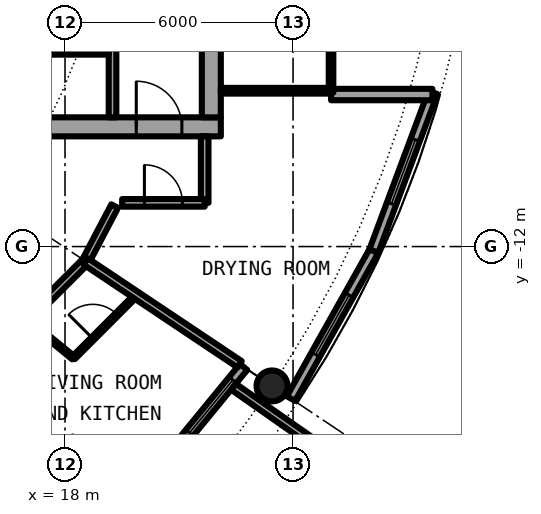
"""IFC4 building model, lengths in metres.
Left out: names, types, materials, properties, quantities, classifications, styles, units other than length and angle.
Written with IfcOpenShell. Run it as: python <this file> out.ifc"""

import sys

from ifc_helpers import new_model, si_unit, direction, frame, frame_2d, origin, origin_2d, place, context, subcontext, project, spatial, rectangle, hollow_circle, extrude, element, fill, save


model = new_model("IFC4")
c1 = context("Model", 3, precision=1e-05, world=origin(), true_north=direction((0.0, 1.0)))
c2 = subcontext(c1, "Body", "Model", "MODEL_VIEW")
j1 = project(units=[si_unit("LENGTHUNIT", "METRE"), si_unit("PLANEANGLEUNIT", "RADIAN")], contexts=[c1])
p1 = place(None, origin())
s1 = spatial("IfcSite", under=j1, at=p1, CompositionType="ELEMENT")
p2 = place(p1, origin())
s2 = spatial("IfcBuilding", under=s1, at=p2, CompositionType="ELEMENT")
p3 = place(p2, frame((0.0, 0.0, 170.75)))
s3 = spatial("IfcBuildingStorey", under=s2, at=p3, CompositionType="ELEMENT", Elevation=170.75)
p4 = place(p3, frame((23.448, -15.667, 0.0), z_axis=(0.0, 0.0, 1.0), x_axis=(1.0, 0.0, 0.0)))
e1 = element("IfcColumn", 1, at=p4, inside=s3, PredefinedType="COLUMN", context=c2, shape_type="SweptSolid", body=[
    extrude(hollow_circle(Radius=0.406, WallThickness=0.04, at=origin_2d()), origin(), (0.0, 0.0, 1.0), 3.05),
])
p5 = place(p3, frame((19.304, -19.304, 0.0), z_axis=(0.0, 0.0, 1.0), x_axis=(0.634382322723, 0.773019449054, 0.0)))
e2 = element("IfcWall", 2, at=p5, inside=s3, PredefinedType="SOLIDWALL", context=c2, shape_type="SweptSolid", body=[
    extrude(rectangle(XDim=5.352, YDim=0.25, at=frame_2d((2.676, 0.0))), origin(), (0.0, 0.0, 1.0), 2.7),
])
p6 = place(p5, frame((0.841, 0.0, 0.0)))
e3 = element("IfcOpeningElement", 3, at=p6, cuts=e2, PredefinedType="OPENING", context=c2, shape_type="SweptSolid", body=[
    extrude(rectangle(XDim=1.0, YDim=2.2, at=frame_2d((0.5, 1.1))), frame((0.0, 0.135, 0.0), z_axis=(0.0, -1.0, 0.0), x_axis=(1.0, 0.0, 0.0)), (0.0, 0.0, 1.0), 0.27),
])
p7 = place(p5, frame((3.111, 0.0, 0.3)))
e4 = element("IfcOpeningElement", 4, at=p7, cuts=e2, PredefinedType="OPENING", context=c2, shape_type="SweptSolid", body=[
    extrude(rectangle(XDim=1.8, YDim=2.1, at=frame_2d((0.9, 1.05))), frame((0.0, 0.135, 0.0), z_axis=(0.0, -1.0, 0.0), x_axis=(1.0, 0.0, 0.0)), (0.0, 0.0, 1.0), 0.27),
])
p8 = place(p3, frame((22.433, -15.688, -0.03), z_axis=(0.0, 0.0, 1.0), x_axis=(0.819373043115, -0.573260687834, 0.0)))
e5 = element("IfcWall", 5, at=p8, inside=s3, PredefinedType="SOLIDWALL", context=c2, shape_type="SweptSolid", body=[
    extrude(rectangle(XDim=2.925, YDim=0.2, at=frame_2d((1.463, 0.0))), origin(), (0.0, 0.0, 1.0), 2.73),
])
p9 = place(p3, frame((23.946, -16.0, 0.0), z_axis=(0.0, 0.0, 1.0), x_axis=(0.489696356642, 0.871893042919, 0.0)))
e6 = element("IfcWall", 6, at=p9, inside=s3, PredefinedType="SOLIDWALL", context=c2, shape_type="SweptSolid", body=[
    extrude(rectangle(XDim=4.454, YDim=0.25, at=frame_2d((2.227, 0.0))), origin(), (0.0, 0.0, 1.0), 2.7),
])
p10 = place(p9, frame((1.327, 0.0, 0.3)))
e7 = element("IfcOpeningElement", 7, at=p10, cuts=e6, PredefinedType="OPENING", context=c2, shape_type="SweptSolid", body=[
    extrude(rectangle(XDim=1.8, YDim=2.1, at=frame_2d((0.9, 1.05))), frame((0.0, 0.135, 0.0), z_axis=(0.0, -1.0, 0.0), x_axis=(1.0, 0.0, 0.0)), (0.0, 0.0, 1.0), 0.27),
])
p11 = place(p3, frame((26.127, -12.117, 0.0), z_axis=(0.0, 0.0, 1.0), x_axis=(0.349247811493, 0.937030397675, 0.0)))
e8 = element("IfcWall", 8, at=p11, inside=s3, PredefinedType="SOLIDWALL", context=c2, shape_type="SweptSolid", body=[
    extrude(rectangle(XDim=4.452, YDim=0.25, at=frame_2d((2.226, 0.0))), origin(), (0.0, 0.0, 1.0), 2.7),
])
p12 = place(p11, frame((1.327, 0.0, 0.3)))
e9 = element("IfcOpeningElement", 9, at=p12, cuts=e8, PredefinedType="OPENING", context=c2, shape_type="SweptSolid", body=[
    extrude(rectangle(XDim=1.8, YDim=2.1, at=frame_2d((0.9, 1.05))), frame((0.0, 0.135, 0.0), z_axis=(0.0, -1.0, 0.0), x_axis=(1.0, 0.0, 0.0)), (0.0, 0.0, 1.0), 0.27),
])
p13 = place(p3, frame((25.0, -8.0, 0.0), z_axis=(0.0, 0.0, 1.0), x_axis=(1.0, 0.0, 0.0)))
e10 = element("IfcWall", 10, at=p13, inside=s3, PredefinedType="SOLIDWALL", context=c2, shape_type="SweptSolid", body=[
    extrude(rectangle(XDim=2.667, YDim=0.3, at=frame_2d((1.333, 0.0))), origin(), (0.0, 0.0, 1.0), 2.7),
])
p14 = place(p3, frame((8.5, -8.85, 0.0), z_axis=(0.0, 0.0, 1.0), x_axis=(1.0, 0.0, 0.0)))
e11 = element("IfcWall", 11, at=p14, inside=s3, PredefinedType="SHEAR", context=c2, shape_type="SweptSolid", body=[
    extrude(rectangle(XDim=13.6, YDim=0.5, at=frame_2d((6.8, 0.0))), origin(), (0.0, 0.0, 1.0), 3.05),
])
p15 = place(p14, frame((11.375, 0.0, 0.0)))
e12 = element("IfcOpeningElement", 12, at=p15, cuts=e11, PredefinedType="OPENING", context=c2, shape_type="SweptSolid", body=[
    extrude(rectangle(XDim=1.2, YDim=2.3, at=frame_2d((0.6, 1.15))), frame((0.0, 0.26, 0.0), z_axis=(0.0, -1.0, 0.0), x_axis=(1.0, 0.0, 0.0)), (0.0, 0.0, 1.0), 0.52),
])
p16 = place(p3, frame((21.85, 8.6, 0.0), z_axis=(0.0, 0.0, 1.0), x_axis=(0.0, -1.0, 0.0)))
e13 = element("IfcWall", 13, at=p16, inside=s3, PredefinedType="SHEAR", context=c2, shape_type="SweptSolid", body=[
    extrude(rectangle(XDim=17.2, YDim=0.5, at=frame_2d((8.6, 0.0))), origin(), (0.0, 0.0, 1.0), 3.05),
])
p17 = place(p16, frame((7.7, 0.0, 0.0)))
e14 = element("IfcOpeningElement", 14, at=p17, cuts=e13, PredefinedType="OPENING", context=c2, shape_type="SweptSolid", body=[
    extrude(rectangle(XDim=1.8, YDim=2.3, at=frame_2d((0.9, 1.15))), frame((0.0, 0.26, 0.0), z_axis=(0.0, -1.0, 0.0), x_axis=(1.0, 0.0, 0.0)), (0.0, 0.0, 1.0), 0.52),
])
p18 = place(p3, frame((19.25, -8.6, 0.0), z_axis=(0.0, 0.0, 1.0), x_axis=(0.0, 1.0, 0.0)))
e15 = element("IfcWall", 15, at=p18, inside=s3, PredefinedType="SOLIDWALL", context=c2, shape_type="SweptSolid", body=[
    extrude(rectangle(XDim=7.025, YDim=0.2, at=frame_2d((3.513, 0.0))), origin(), (0.0, 0.0, 1.0), 2.7),
])
p19 = place(p18, frame((2.35, 0.0, 0.0)))
e16 = element("IfcOpeningElement", 16, at=p19, cuts=e15, PredefinedType="OPENING", context=c2, shape_type="SweptSolid", body=[
    extrude(rectangle(XDim=1.1, YDim=2.3, at=frame_2d((0.55, 1.15))), frame((0.0, 0.11, 0.0), z_axis=(0.0, -1.0, 0.0), x_axis=(1.0, 0.0, 0.0)), (0.0, 0.0, 1.0), 0.22),
])
p20 = place(p3, frame((15.45, -6.875, 0.0), z_axis=(0.0, 0.0, 1.0), x_axis=(1.0, 0.0, 0.0)))
e17 = element("IfcWall", 17, at=p20, inside=s3, PredefinedType="PARTITIONING", context=c2, shape_type="SweptSolid", body=[
    extrude(rectangle(XDim=3.7, YDim=0.15, at=frame_2d((1.85, 0.0))), origin(), (0.0, 0.0, 1.0), 2.7),
])
p21 = place(p20, frame((1.4, 0.0, 0.0)))
e18 = element("IfcOpeningElement", 18, at=p21, cuts=e17, PredefinedType="OPENING", context=c2, shape_type="SweptSolid", body=[
    extrude(rectangle(XDim=0.9, YDim=2.3, at=frame_2d((0.45, 1.15))), frame((0.0, 0.085, 0.0), z_axis=(0.0, -1.0, 0.0), x_axis=(1.0, 0.0, 0.0)), (0.0, 0.0, 1.0), 0.17),
])
p22 = place(p3, frame((22.1, -7.9, 0.0), z_axis=(0.0, 0.0, 1.0), x_axis=(1.0, 0.0, 0.0)))
e19 = element("IfcWall", 19, at=p22, inside=s3, PredefinedType="PARTITIONING", context=c2, shape_type="SweptSolid", body=[
    extrude(rectangle(XDim=2.84, YDim=0.15, at=frame_2d((1.42, 0.0))), origin(), (0.0, 0.0, 1.0), 2.7),
])
p23 = place(p3, frame((25.0, -7.95, 0.0), z_axis=(0.0, 0.0, 1.0), x_axis=(0.0, 1.0, 0.0)))
e20 = element("IfcWall", 20, at=p23, inside=s3, PredefinedType="PARTITIONING", context=c2, shape_type="SweptSolid", body=[
    extrude(rectangle(XDim=15.9, YDim=0.12, at=frame_2d((7.95, 0.0))), origin(), (0.0, 0.0, 1.0), 2.7),
])
p24 = place(p23, frame((0.95, 0.0, 0.1)))
e21 = element("IfcOpeningElement", 21, at=p24, cuts=e20, PredefinedType="OPENING", context=c2, shape_type="SweptSolid", body=[
    extrude(rectangle(XDim=14.0, YDim=2.35, at=frame_2d((7.0, 1.175))), frame((0.0, 0.07, 0.0), z_axis=(0.0, -1.0, 0.0), x_axis=(1.0, 0.0, 0.0)), (0.0, 0.0, 1.0), 0.14),
])
p25 = place(p3, frame((18.224, -14.927, 0.0), z_axis=(0.0, 0.0, 1.0), x_axis=(0.706897299114, 0.707316201218, 0.0)))
e22 = element("IfcWall", 22, at=p25, inside=s3, PredefinedType="PARTITIONING", context=c2, shape_type="SweptSolid", body=[
    extrude(rectangle(XDim=2.331, YDim=0.1, at=frame_2d((1.166, 0.0))), origin(), (0.0, 0.0, 1.0), 2.7),
])
p26 = place(p25, frame((0.716, 0.0, 0.0)))
e23 = element("IfcOpeningElement", 23, at=p26, cuts=e22, PredefinedType="OPENING", context=c2, shape_type="SweptSolid", body=[
    extrude(rectangle(XDim=0.9, YDim=2.3, at=frame_2d((0.45, 1.15))), frame((0.0, 0.06, 0.0), z_axis=(0.0, -1.0, 0.0), x_axis=(1.0, 0.0, 0.0)), (0.0, 0.0, 1.0), 0.12),
])
p27 = place(p3, frame((18.542, -12.389, 0.0), z_axis=(0.0, 0.0, 1.0), x_axis=(0.465605550524, 0.884992356646, 0.0)))
e24 = element("IfcWall", 24, at=p27, inside=s3, PredefinedType="PARTITIONING", context=c2, shape_type="SweptSolid", body=[
    extrude(rectangle(XDim=1.643, YDim=0.2, at=frame_2d((0.821, 0.0))), origin(), (0.0, 0.0, 1.0), 2.7),
])
p28 = place(p3, frame((12.389, -18.542, 0.0), z_axis=(0.0, 0.0, 1.0), x_axis=(0.707106781187, 0.707106781187, 0.0)))
e25 = element("IfcWall", 25, at=p28, inside=s3, PredefinedType="PARTITIONING", context=c2, shape_type="SweptSolid", body=[
    extrude(rectangle(XDim=8.702, YDim=0.2, at=frame_2d((4.351, 0.0))), origin(), (0.0, 0.0, 1.0), 2.7),
])
p29 = place(p28, frame((2.763, 0.0, 0.0)))
e26 = element("IfcOpeningElement", 26, at=p29, cuts=e25, PredefinedType="OPENING", context=c2, shape_type="SweptSolid", body=[
    extrude(rectangle(XDim=1.0, YDim=2.3, at=frame_2d((0.5, 1.15))), frame((0.0, 0.11, 0.0), z_axis=(0.0, -1.0, 0.0), x_axis=(1.0, 0.0, 0.0)), (0.0, 0.0, 1.0), 0.22),
])
p30 = place(p3, frame((21.675, -10.85, 0.0), z_axis=(0.0, 0.0, 1.0), x_axis=(0.0, 1.0, 0.0)))
e27 = element("IfcWall", 27, at=p30, inside=s3, PredefinedType="PARTITIONING", context=c2, shape_type="SweptSolid", body=[
    extrude(rectangle(XDim=1.75, YDim=0.2, at=frame_2d((0.875, 0.0))), origin(), (0.0, 0.0, 1.0), 2.7),
])
p31 = place(p3, frame((19.504, -10.85, 0.0), z_axis=(0.0, 0.0, 1.0), x_axis=(1.0, 0.0, 0.0)))
e28 = element("IfcWall", 28, at=p31, inside=s3, PredefinedType="PARTITIONING", context=c2, shape_type="SweptSolid", body=[
    extrude(rectangle(XDim=2.171, YDim=0.2, at=frame_2d((1.085, 0.0))), origin(), (0.0, 0.0, 1.0), 2.7),
])
p32 = place(p31, frame((0.585, 0.0, 0.0)))
e29 = element("IfcOpeningElement", 29, at=p32, cuts=e28, PredefinedType="OPENING", context=c2, shape_type="SweptSolid", body=[
    extrude(rectangle(XDim=1.0, YDim=2.3, at=frame_2d((0.5, 1.15))), frame((0.0, 0.11, 0.0), z_axis=(0.0, -1.0, 0.0), x_axis=(1.0, 0.0, 0.0)), (0.0, 0.0, 1.0), 0.22),
])
p33 = place(p3, frame((16.575, -16.575, 0.0), z_axis=(0.0, 0.0, 1.0), x_axis=(0.707106781187, -0.707106781187, 0.0)))
e30 = element("IfcWall", 30, at=p33, inside=s3, PredefinedType="PARTITIONING", context=c2, shape_type="SweptSolid", body=[
    extrude(rectangle(XDim=3.735, YDim=0.1, at=frame_2d((1.868, 0.0))), origin(), (0.0, 0.0, 1.0), 2.7),
])
p34 = place(p33, frame((1.417, 0.0, 0.0)))
e31 = element("IfcOpeningElement", 31, at=p34, cuts=e30, PredefinedType="OPENING", context=c2, shape_type="SweptSolid", body=[
    extrude(rectangle(XDim=0.9, YDim=2.3, at=frame_2d((0.45, 1.15))), frame((0.0, 0.06, 0.0), z_axis=(0.0, -1.0, 0.0), x_axis=(1.0, 0.0, 0.0)), (0.0, 0.0, 1.0), 0.12),
])
p35 = place(p3, frame((17.001, -13.93, 0.0), z_axis=(0.0, 0.0, 1.0), x_axis=(0.773633255921, -0.633633636523, 0.0)))
e32 = element("IfcWall", 32, at=p35, inside=s3, PredefinedType="PARTITIONING", context=c2, shape_type="SweptSolid", body=[
    extrude(rectangle(XDim=1.578, YDim=0.1, at=frame_2d((0.789, 0.0))), origin(), (0.0, 0.0, 1.0), 2.7),
])
p36 = place(p3, frame((18.542, -12.389, 0.0), z_axis=(0.0, 0.0, 1.0), x_axis=(0.831387096605, -0.55569370664, 0.0)))
e33 = element("IfcWall", 33, at=p36, inside=s3, PredefinedType="PARTITIONING", context=c2, shape_type="SweptSolid", body=[
    extrude(rectangle(XDim=4.875, YDim=0.2, at=frame_2d((2.438, 0.0))), origin(), (0.0, 0.0, 1.0), 2.7),
])
p37 = place(p7, origin())
e34 = element("IfcWindow", 34, at=p37, inside=s3, PartitioningType="SINGLE_PANEL", PredefinedType="WINDOW", context=c2, shape_type="SweptSolid", body=[
    extrude(rectangle(XDim=1.8, YDim=2.1, at=frame_2d((0.9, 1.05))), frame((0.0, 0.03, 0.0), z_axis=(0.0, -1.0, 0.0), x_axis=(1.0, 0.0, 0.0)), (0.0, 0.0, 1.0), 0.06),
])
fill(e4, e34)
p38 = place(p10, origin())
e35 = element("IfcWindow", 35, at=p38, inside=s3, PartitioningType="SINGLE_PANEL", PredefinedType="WINDOW", context=c2, shape_type="SweptSolid", body=[
    extrude(rectangle(XDim=1.8, YDim=2.1, at=frame_2d((0.9, 1.05))), frame((0.0, 0.03, 0.0), z_axis=(0.0, -1.0, 0.0), x_axis=(1.0, 0.0, 0.0)), (0.0, 0.0, 1.0), 0.06),
])
fill(e7, e35)
p39 = place(p12, origin())
e36 = element("IfcWindow", 36, at=p39, inside=s3, PartitioningType="SINGLE_PANEL", PredefinedType="WINDOW", context=c2, shape_type="SweptSolid", body=[
    extrude(rectangle(XDim=1.8, YDim=2.1, at=frame_2d((0.9, 1.05))), frame((0.0, 0.03, 0.0), z_axis=(0.0, -1.0, 0.0), x_axis=(1.0, 0.0, 0.0)), (0.0, 0.0, 1.0), 0.06),
])
fill(e9, e36)
p40 = place(p21, origin())
e37 = element("IfcDoor", 37, at=p40, inside=s3, OperationType="SINGLE_SWING_LEFT", PredefinedType="DOOR", context=c2, shape_type="SweptSolid", body=[
    extrude(rectangle(XDim=0.9, YDim=2.3, at=frame_2d((0.45, 1.15))), frame((0.0, 0.025, 0.0), z_axis=(0.0, -1.0, 0.0), x_axis=(1.0, 0.0, 0.0)), (0.0, 0.0, 1.0), 0.05),
])
fill(e18, e37)
p41 = place(p15, origin())
e38 = element("IfcDoor", 38, at=p41, inside=s3, OperationType="SINGLE_SWING_LEFT", PredefinedType="DOOR", context=c2, shape_type="SweptSolid", body=[
    extrude(rectangle(XDim=1.2, YDim=2.3, at=frame_2d((0.6, 1.15))), frame((0.0, 0.025, 0.0), z_axis=(0.0, -1.0, 0.0), x_axis=(1.0, 0.0, 0.0)), (0.0, 0.0, 1.0), 0.05),
])
fill(e12, e38)
p42 = place(p24, origin())
e39 = element("IfcWindow", 39, at=p42, inside=s3, PartitioningType="SINGLE_PANEL", PredefinedType="WINDOW", context=c2, shape_type="SweptSolid", body=[
    extrude(rectangle(XDim=14.0, YDim=2.35, at=frame_2d((7.0, 1.175))), frame((0.0, 0.03, 0.0), z_axis=(0.0, -1.0, 0.0), x_axis=(1.0, 0.0, 0.0)), (0.0, 0.0, 1.0), 0.06),
])
fill(e21, e39)
p43 = place(p26, origin())
e40 = element("IfcDoor", 40, at=p43, inside=s3, OperationType="SINGLE_SWING_RIGHT", PredefinedType="DOOR", context=c2, shape_type="SweptSolid", body=[
    extrude(rectangle(XDim=0.9, YDim=2.3, at=frame_2d((0.45, 1.15))), frame((0.0, 0.025, 0.0), z_axis=(0.0, -1.0, 0.0), x_axis=(1.0, 0.0, 0.0)), (0.0, 0.0, 1.0), 0.05),
])
fill(e23, e40)
p44 = place(p32, origin())
e41 = element("IfcDoor", 41, at=p44, inside=s3, OperationType="SINGLE_SWING_LEFT", PredefinedType="DOOR", context=c2, shape_type="SweptSolid", body=[
    extrude(rectangle(XDim=1.0, YDim=2.3, at=frame_2d((0.5, 1.15))), frame((0.0, 0.025, 0.0), z_axis=(0.0, -1.0, 0.0), x_axis=(1.0, 0.0, 0.0)), (0.0, 0.0, 1.0), 0.05),
])
fill(e29, e41)
save(model, sys.argv[1])
